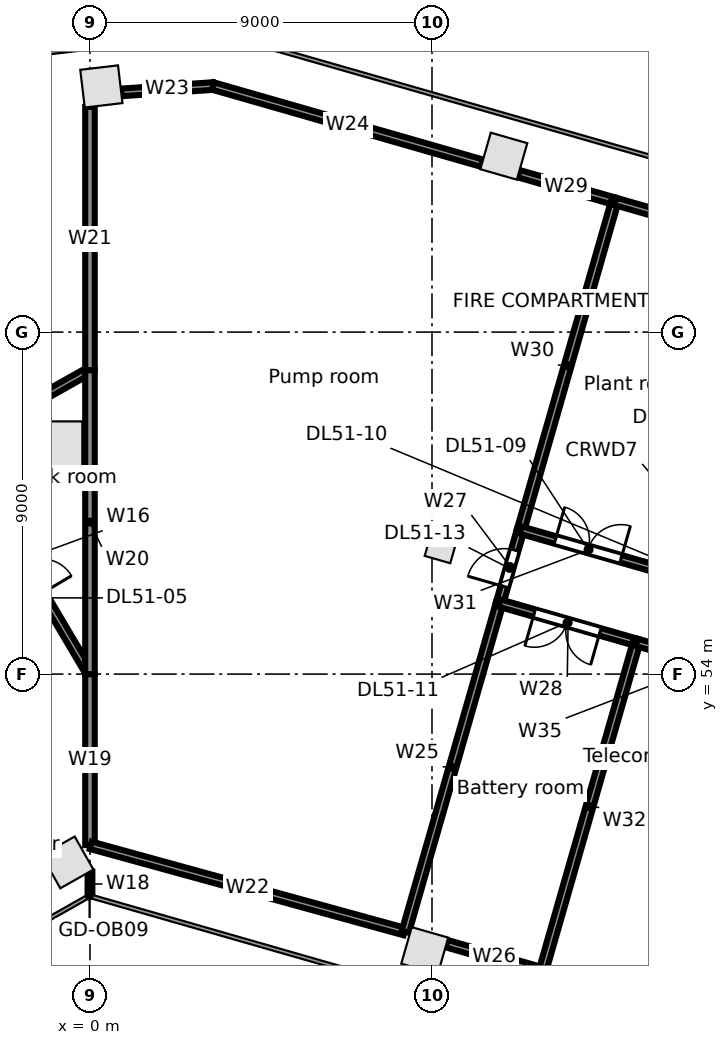
"""IFC4 building model, lengths in metres.
Left out: names, types, materials, properties, quantities, classifications, styles, units other than length and angle.
Written with IfcOpenShell. Run it as: python <this file> out.ifc"""

import sys

from ifc_helpers import new_model, si_unit, direction, frame, frame_2d, origin, origin_2d, place, context, subcontext, project, spatial, rectangle, extrude, element, fill, save


model = new_model("IFC4")
c1 = context("Model", 3, precision=1e-05, world=origin(), true_north=direction((0.0, 1.0)))
c2 = subcontext(c1, "Body", "Model", "MODEL_VIEW")
j1 = project(units=[si_unit("LENGTHUNIT", "METRE"), si_unit("PLANEANGLEUNIT", "RADIAN")], contexts=[c1])
p1 = place(None, origin())
s1 = spatial("IfcSite", under=j1, at=p1, CompositionType="ELEMENT")
p2 = place(p1, origin())
s2 = spatial("IfcBuilding", under=s1, at=p2, CompositionType="ELEMENT")
p3 = place(p2, frame((0.0, 0.0, 230.9)))
s3 = spatial("IfcBuildingStorey", under=s2, at=p3, CompositionType="ELEMENT", Elevation=230.9)
for number, where, z_axis, x_axis in (
    (1, (10.89, 67.629, 0.0), (0.0, 0.0, 1.0), (-0.961, 0.276, 0.0)),
    (2, (0.3, 69.464, 0.0), (0.0, 0.0, 1.0), (-0.993, -0.118, 0.0)),
    (3, (-0.591, 49.044, 0.0), (0.0, 0.0, 1.0), (0.87, 0.492, 0.0)),
    (4, (8.81, 46.722, 0.0), (0.0, 0.0, 1.0), (0.961, -0.276, 0.0)),
):
    element("IfcColumn", number, at=place(p3, frame(where, z_axis=z_axis, x_axis=x_axis)), inside=s3, PredefinedType="COLUMN", context=c2, shape_type="SweptSolid", body=[
        extrude(rectangle(XDim=1.0, YDim=1.0, at=origin_2d()), origin(), (0.0, 0.0, 1.0), 7.8),
    ])
p4 = place(p3, frame((-0.85, 60.0, 0.0), z_axis=(0.0, 0.0, 1.0), x_axis=(0.0, 1.0, 0.0)))
e5 = element("IfcColumn", 5, at=p4, inside=s3, PredefinedType="COLUMN", context=c2, shape_type="SweptSolid", body=[
    extrude(rectangle(XDim=1.3, YDim=1.3, at=origin_2d()), origin(), (0.0, 0.0, 1.0), 7.8),
])
p5 = place(p3, frame((9.241, 57.35, 0.0), z_axis=(0.0, 0.0, 1.0), x_axis=(0.961261695938, -0.275637355817, 0.0)))
e6 = element("IfcColumn", 6, at=p5, inside=s3, PredefinedType="COLUMN", context=c2, shape_type="SweptSolid", body=[
    extrude(rectangle(XDim=0.7, YDim=0.7, at=origin_2d()), origin(), (0.0, 0.0, 1.0), 7.8),
])
p6 = place(p3, frame((-3.552, 60.001, 0.0), z_axis=(0.0, 0.0, 1.0), x_axis=(0.509363754352, -0.860551315002, 0.0)))
e7 = element("IfcWall", 7, at=p6, inside=s3, PredefinedType="PARTITIONING", context=c2, shape_type="SweptSolid", body=[
    extrude(rectangle(XDim=6.973, YDim=0.2, at=frame_2d((3.487, 0.0))), origin(), (0.0, 0.0, 1.0), 6.7),
])
p7 = place(p6, frame((2.7, 0.0, 0.0)))
e8 = element("IfcOpeningElement", 8, at=p7, cuts=e7, PredefinedType="OPENING", context=c2, shape_type="SweptSolid", body=[
    extrude(rectangle(XDim=1.8, YDim=2.1, at=frame_2d((0.9, 1.05))), frame((0.0, 0.11, 0.0), z_axis=(0.0, -1.0, 0.0), x_axis=(1.0, 0.0, 0.0)), (0.0, 0.0, 1.0), 0.22),
])
p8 = place(p3, frame((-3.552, 60.001, 0.0), z_axis=(0.0, 0.0, 1.0), x_axis=(0.87146833824, 0.490451766686, 0.0)))
e9 = element("IfcWall", 9, at=p8, inside=s3, PredefinedType="PARTITIONING", context=c2, shape_type="SweptSolid", body=[
    extrude(rectangle(XDim=4.076, YDim=0.2, at=frame_2d((2.038, 0.0))), origin(), (0.0, 0.0, 1.0), 6.8),
])
p9 = place(p3, frame((0.0, 48.15, 0.0), z_axis=(0.0, 0.0, 1.0), x_axis=(0.0, 1.0, 0.0)))
e10 = element("IfcWall", 10, at=p9, inside=s3, PredefinedType="PARTITIONING", context=c2, shape_type="SweptSolid", body=[
    extrude(rectangle(XDim=0.654, YDim=0.125, at=frame_2d((0.327, 0.0))), origin(), (0.0, 0.0, 1.0), 7.52),
])
p10 = place(p3, frame((0.0, 49.5, 0.0), z_axis=(0.0, 0.0, 1.0), x_axis=(0.0, 1.0, 0.0)))
e11 = element("IfcWall", 11, at=p10, inside=s3, PredefinedType="PARTITIONING", context=c2, shape_type="SweptSolid", body=[
    extrude(rectangle(XDim=4.5, YDim=0.25, at=frame_2d((2.25, 0.0))), origin(), (0.0, 0.0, 1.0), 7.52),
])
p11 = place(p3, frame((0.0, 54.0, 0.0), z_axis=(0.0, 0.0, 1.0), x_axis=(0.0, 1.0, 0.0)))
e12 = element("IfcWall", 12, at=p11, inside=s3, PredefinedType="PARTITIONING", context=c2, shape_type="SweptSolid", body=[
    extrude(rectangle(XDim=8.0, YDim=0.25, at=frame_2d((4.0, 0.0))), origin(), (0.0, 0.0, 1.0), 6.7),
])
p12 = place(p3, frame((0.0, 62.0, 0.0), z_axis=(0.0, 0.0, 1.0), x_axis=(0.0, 1.0, 0.0)))
e13 = element("IfcWall", 13, at=p12, inside=s3, PredefinedType="PARTITIONING", context=c2, shape_type="SweptSolid", body=[
    extrude(rectangle(XDim=6.925, YDim=0.25, at=frame_2d((3.462, 0.0))), origin(), (0.0, 0.0, 1.0), 6.8),
])
p13 = place(p3, frame((0.02, 49.495, 0.0), z_axis=(0.0, 0.0, 1.0), x_axis=(0.964176057391, -0.265263134179, 0.0)))
e14 = element("IfcWall", 14, at=p13, inside=s3, PredefinedType="PARTITIONING", context=c2, shape_type="SweptSolid", body=[
    extrude(rectangle(XDim=8.566, YDim=0.2, at=frame_2d((4.283, 0.0))), origin(), (0.0, 0.0, 1.0), 7.52),
])
p14 = place(p3, frame((0.822, 69.307, 0.0), z_axis=(0.0, 0.0, 1.0), x_axis=(0.997583073063, 0.069483899852, 0.0)))
e15 = element("IfcWall", 15, at=p14, inside=s3, PredefinedType="PARTITIONING", context=c2, shape_type="SweptSolid", body=[
    extrude(rectangle(XDim=2.421, YDim=0.2, at=frame_2d((1.21, 0.0))), origin(), (0.0, 0.0, 1.0), 6.8),
])
p15 = place(p3, frame((3.237, 69.475, 0.0), z_axis=(0.0, 0.0, 1.0), x_axis=(0.961264589349, -0.275627265093, 0.0)))
e16 = element("IfcWall", 16, at=p15, inside=s3, PredefinedType="PARTITIONING", context=c2, shape_type="SweptSolid", body=[
    extrude(rectangle(XDim=7.365, YDim=0.2, at=frame_2d((3.683, 0.0))), origin(), (0.0, 0.0, 1.0), 6.8),
])
p16 = place(p3, frame((8.298, 47.218, 0.0), z_axis=(0.0, 0.0, 1.0), x_axis=(0.275674053528, 0.961251172281, 0.0)))
e17 = element("IfcWall", 17, at=p16, inside=s3, PredefinedType="PARTITIONING", context=c2, shape_type="SweptSolid", body=[
    extrude(rectangle(XDim=9.0, YDim=0.2, at=frame_2d((4.5, 0.0))), origin(), (0.0, 0.0, 1.0), 6.8),
])
p17 = place(p3, frame((9.383, 46.907, 0.0), z_axis=(0.0, 0.0, 1.0), x_axis=(0.961237645594, -0.275721215529, 0.0)))
e18 = element("IfcWall", 18, at=p17, inside=s3, PredefinedType="PARTITIONING", context=c2, shape_type="SweptSolid", body=[
    extrude(rectangle(XDim=2.611, YDim=0.2, at=frame_2d((1.306, 0.0))), origin(), (0.0, 0.0, 1.0), 7.52),
])
p18 = place(p3, frame((10.779, 55.869, 0.0), z_axis=(0.0, 0.0, 1.0), x_axis=(0.275575706981, 0.961279371318, 0.0)))
e19 = element("IfcWall", 19, at=p18, inside=s3, PredefinedType="PARTITIONING", context=c2, shape_type="SweptSolid", body=[
    extrude(rectangle(XDim=2.0, YDim=0.2, at=frame_2d((1.0, 0.0))), origin(), (0.0, 0.0, 1.0), 6.7),
])
p19 = place(p18, frame((0.45, 0.0, 0.0)))
e20 = element("IfcOpeningElement", 20, at=p19, cuts=e19, PredefinedType="OPENING", context=c2, shape_type="SweptSolid", body=[
    extrude(rectangle(XDim=1.0, YDim=2.1, at=frame_2d((0.5, 1.05))), frame((0.0, 0.11, 0.0), z_axis=(0.0, -1.0, 0.0), x_axis=(1.0, 0.0, 0.0)), (0.0, 0.0, 1.0), 0.22),
])
p20 = place(p3, frame((10.779, 55.869, 0.0), z_axis=(0.0, 0.0, 1.0), x_axis=(0.961245866545, -0.275692553489, 0.0)))
e21 = element("IfcWall", 21, at=p20, inside=s3, PredefinedType="PARTITIONING", context=c2, shape_type="SweptSolid", body=[
    extrude(rectangle(XDim=3.75, YDim=0.2, at=frame_2d((1.875, 0.0))), origin(), (0.0, 0.0, 1.0), 6.7),
])
p21 = place(p20, frame((0.95, 0.0, 0.0)))
e22 = element("IfcOpeningElement", 22, at=p21, cuts=e21, PredefinedType="OPENING", context=c2, shape_type="SweptSolid", body=[
    extrude(rectangle(XDim=1.8, YDim=2.1, at=frame_2d((0.9, 1.05))), frame((0.0, 0.11, 0.0), z_axis=(0.0, -1.0, 0.0), x_axis=(1.0, 0.0, 0.0)), (0.0, 0.0, 1.0), 0.22),
])
p22 = place(p3, frame((11.278, 67.169, 0.0), z_axis=(0.0, 0.0, 1.0), x_axis=(0.961252227854, -0.275670372813, 0.0)))
e23 = element("IfcWall", 23, at=p22, inside=s3, PredefinedType="PARTITIONING", context=c2, shape_type="SweptSolid", body=[
    extrude(rectangle(XDim=2.615, YDim=0.2, at=frame_2d((1.308, 0.0))), origin(), (0.0, 0.0, 1.0), 7.52),
])
p23 = place(p3, frame((11.33, 57.791, 0.0), z_axis=(0.0, 0.0, 1.0), x_axis=(0.275638114595, 0.961261478362, 0.0)))
e24 = element("IfcWall", 24, at=p23, inside=s3, PredefinedType="PARTITIONING", context=c2, shape_type="SweptSolid", body=[
    extrude(rectangle(XDim=9.001, YDim=0.2, at=frame_2d((4.5, 0.0))), origin(), (0.0, 0.0, 1.0), 6.692),
])
p24 = place(p3, frame((11.33, 57.791, 0.0), z_axis=(0.0, 0.0, 1.0), x_axis=(0.961314848061, -0.275451924837, 0.0)))
e25 = element("IfcWall", 25, at=p24, inside=s3, PredefinedType="PARTITIONING", context=c2, shape_type="SweptSolid", body=[
    extrude(rectangle(XDim=3.75, YDim=0.2, at=frame_2d((1.875, 0.0))), origin(), (0.0, 0.0, 1.0), 7.52),
])
p25 = place(p24, frame((0.95, 0.0, 0.0)))
e26 = element("IfcOpeningElement", 26, at=p25, cuts=e25, PredefinedType="OPENING", context=c2, shape_type="SweptSolid", body=[
    extrude(rectangle(XDim=1.8, YDim=2.1, at=frame_2d((0.9, 1.05))), frame((0.0, 0.11, 0.0), z_axis=(0.0, -1.0, 0.0), x_axis=(1.0, 0.0, 0.0)), (0.0, 0.0, 1.0), 0.22),
])
p26 = place(p3, frame((11.903, 46.184, 0.0), z_axis=(0.0, 0.0, 1.0), x_axis=(0.275674053528, 0.961251172281, 0.0)))
e27 = element("IfcWall", 27, at=p26, inside=s3, PredefinedType="PARTITIONING", context=c2, shape_type="SweptSolid", body=[
    extrude(rectangle(XDim=9.0, YDim=0.2, at=frame_2d((4.5, 0.0))), origin(), (0.0, 0.0, 1.0), 7.52),
])
p27 = place(p3, frame((13.821, 66.44, 0.0), z_axis=(0.0, 0.0, 1.0), x_axis=(0.961271569029, -0.27560292193, 0.0)))
e28 = element("IfcWall", 28, at=p27, inside=s3, PredefinedType="PARTITIONING", context=c2, shape_type="SweptSolid", body=[
    extrude(rectangle(XDim=3.729, YDim=0.2, at=frame_2d((1.865, 0.0))), origin(), (0.0, 0.0, 1.0), 7.52),
])
p28 = place(p3, frame((14.384, 54.835, 0.0), z_axis=(0.0, 0.0, 1.0), x_axis=(0.961261679898, -0.275637411757, 0.0)))
e29 = element("IfcWall", 29, at=p28, inside=s3, PredefinedType="PARTITIONING", context=c2, shape_type="SweptSolid", body=[
    extrude(rectangle(XDim=3.976, YDim=0.2, at=frame_2d((1.988, 0.0))), origin(), (0.0, 0.0, 1.0), 7.52),
])
p29 = place(p28, frame((1.2, 0.0, 0.0)))
e30 = element("IfcOpeningElement", 30, at=p29, cuts=e29, PredefinedType="OPENING", context=c2, shape_type="SweptSolid", body=[
    extrude(rectangle(XDim=1.8, YDim=2.1, at=frame_2d((0.9, 1.05))), frame((0.0, 0.11, 0.0), z_axis=(0.0, -1.0, 0.0), x_axis=(1.0, 0.0, 0.0)), (0.0, 0.0, 1.0), 0.22),
])
p30 = place(p25, origin())
e31 = element("IfcDoor", 31, at=p30, inside=s3, OperationType="DOUBLE_DOOR_SINGLE_SWING", PredefinedType="DOOR", context=c2, shape_type="SweptSolid", body=[
    extrude(rectangle(XDim=1.8, YDim=2.1, at=frame_2d((0.9, 1.05))), frame((0.0, 0.025, 0.0), z_axis=(0.0, -1.0, 0.0), x_axis=(1.0, 0.0, 0.0)), (0.0, 0.0, 1.0), 0.05),
])
fill(e26, e31)
p31 = place(p21, frame((1.8, 0.0, 0.0), z_axis=(0.0, 0.0, 1.0), x_axis=(-1.0, 0.0, 0.0)))
e32 = element("IfcDoor", 32, at=p31, inside=s3, OperationType="DOUBLE_DOOR_SINGLE_SWING", PredefinedType="DOOR", context=c2, shape_type="SweptSolid", body=[
    extrude(rectangle(XDim=1.8, YDim=2.1, at=frame_2d((0.9, 1.05))), frame((0.0, 0.025, 0.0), z_axis=(0.0, -1.0, 0.0), x_axis=(1.0, 0.0, 0.0)), (0.0, 0.0, 1.0), 0.05),
])
fill(e22, e32)
p32 = place(p19, origin())
e33 = element("IfcDoor", 33, at=p32, inside=s3, OperationType="SINGLE_SWING_LEFT", PredefinedType="DOOR", context=c2, shape_type="SweptSolid", body=[
    extrude(rectangle(XDim=1.0, YDim=2.1, at=frame_2d((0.5, 1.05))), frame((0.0, 0.025, 0.0), z_axis=(0.0, -1.0, 0.0), x_axis=(1.0, 0.0, 0.0)), (0.0, 0.0, 1.0), 0.05),
])
fill(e20, e33)
save(model, sys.argv[1])
